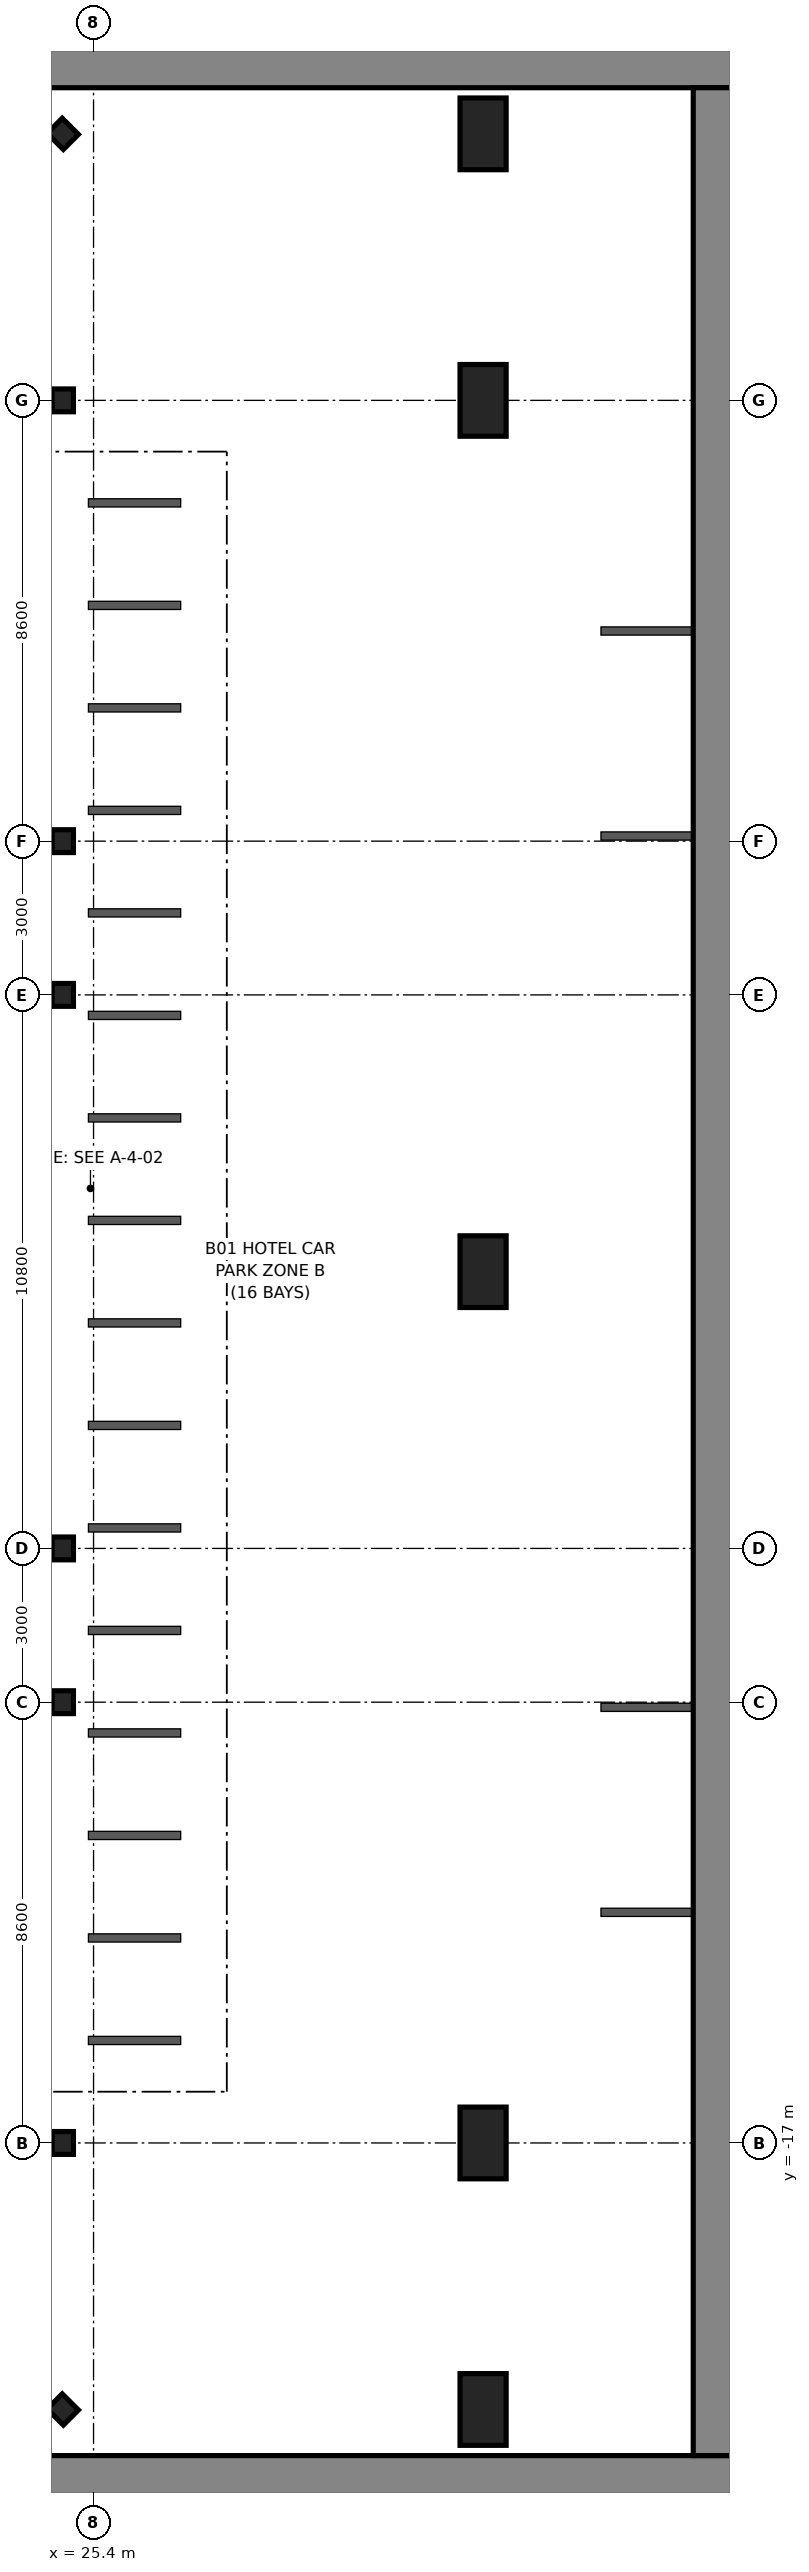
"""IFC4 building model, lengths in metres.
Left out: names, types, materials, properties, quantities, classifications, styles, units other than length and angle.
Written with IfcOpenShell. Run it as: python <this file> out.ifc"""

import sys

from ifc_helpers import new_model, si_unit, direction, frame, frame_2d, origin, origin_2d, place, context, subcontext, project, spatial, rectangle, i_section, extrude, source, transform, mapped, element, save


model = new_model("IFC4")
c1 = context("Model", 3, precision=1e-05, world=origin(), true_north=direction((0.0, 1.0)))
c2 = subcontext(c1, "Body", "Model", "MODEL_VIEW")
j1 = project(units=[si_unit("LENGTHUNIT", "METRE"), si_unit("PLANEANGLEUNIT", "RADIAN")], contexts=[c1])
p1 = place(None, origin())
s1 = spatial("IfcSite", under=j1, at=p1, CompositionType="ELEMENT")
p2 = place(p1, origin())
s2 = spatial("IfcBuilding", under=s1, at=p2, CompositionType="ELEMENT")
p3 = place(p2, frame((0.0, 0.0, -5.4)))
s3 = spatial("IfcBuildingStorey", under=s2, at=p3, CompositionType="ELEMENT", Elevation=-5.4)
m1 = source(origin(), c2, "Body", "SweptSolid", [
    extrude(rectangle(XDim=76.0, YDim=0.9, at=frame_2d((38.0, 0.0))), origin(), (0.0, 0.0, 1.0), 4.98),
])
for number, where, z_axis, x_axis in (
    (1, (-38.0, -23.55, 0.0), (0.0, 0.0, 1.0), (1.0, 0.0, 0.0)),
    (2, (-38.0, 23.55, 0.0), (0.0, 0.0, 1.0), (1.0, 0.0, 0.0)),
):
    element("IfcWall", number, at=place(p3, frame(where, z_axis=z_axis, x_axis=x_axis)), inside=s3, PredefinedType="SHEAR", context=c2, shape_type="MappedRepresentation", body=[
        mapped(m1, transform((0.0, 0.0, 0.0), scale=1.0)),
    ])
m2 = source(origin(), c2, "Body", "SweptSolid", [
    extrude(rectangle(XDim=46.2, YDim=0.9, at=frame_2d((23.1, 0.0))), origin(), (0.0, 0.0, 1.0), 4.98),
])
p4 = place(p3, frame((37.55, -23.1, 0.0), z_axis=(0.0, 0.0, 1.0), x_axis=(0.0, 1.0, 0.0)))
e3 = element("IfcWall", 3, at=p4, inside=s3, PredefinedType="SHEAR", context=c2, shape_type="MappedRepresentation", body=[
    mapped(m2, transform((0.0, 0.0, 0.0), scale=1.0)),
])
m3 = source(origin(), c2, "Body", "SweptSolid", [
    extrude(rectangle(XDim=0.9, YDim=1.4, at=origin_2d()), origin(), (0.0, 0.0, 1.0), 5.355),
])
for number, where, z_axis, x_axis in (
    (4, (33.0, -22.2, 0.0), (0.0, 0.0, 1.0), (1.0, 0.0, 0.0)),
    (5, (33.0, -17.0, 0.0), (0.0, 0.0, 1.0), (1.0, 0.0, 0.0)),
    (6, (33.0, 0.0, 0.0), (0.0, 0.0, 1.0), (1.0, 0.0, 0.0)),
    (7, (33.0, 17.0, 0.0), (0.0, 0.0, 1.0), (1.0, 0.0, 0.0)),
    (8, (33.0, 22.2, 0.0), (0.0, 0.0, 1.0), (1.0, 0.0, 0.0)),
):
    element("IfcColumn", number, at=place(p3, frame(where, z_axis=z_axis, x_axis=x_axis)), inside=s3, PredefinedType="PILASTER", context=c2, shape_type="MappedRepresentation", body=[
        mapped(m3, transform((0.0, 0.0, 0.0), scale=1.0)),
    ])
m4 = source(origin(), c2, "Body", "SweptSolid", [
    extrude(i_section(OverallWidth=0.416, OverallDepth=0.446, WebThickness=0.025, FlangeThickness=0.04, at=origin_2d()), origin(), (0.0, 0.0, 1.0), 5.355),
])
for number, where, z_axis, x_axis in (
    (9, (24.8, -17.0, 0.0), (0.0, 0.0, 1.0), (1.0, 0.0, 0.0)),
    (10, (24.8, -8.4, 0.0), (0.0, 0.0, 1.0), (1.0, 0.0, 0.0)),
    (11, (24.8, -5.4, 0.0), (0.0, 0.0, 1.0), (1.0, 0.0, 0.0)),
    (12, (24.8, 5.4, 0.0), (0.0, 0.0, 1.0), (1.0, 0.0, 0.0)),
    (13, (24.8, 8.4, 0.0), (0.0, 0.0, 1.0), (1.0, 0.0, 0.0)),
    (14, (24.8, 17.0, 0.0), (0.0, 0.0, 1.0), (1.0, 0.0, 0.0)),
    (15, (24.8, -22.2, 0.0), (0.0, 0.0, 1.0), (0.707, 0.707, 0.0)),
    (16, (24.8, 22.2, 0.0), (0.0, 0.0, 1.0), (0.707, 0.707, 0.0)),
):
    element("IfcColumn", number, at=place(p3, frame(where, z_axis=z_axis, x_axis=x_axis)), inside=s3, PredefinedType="COLUMN", context=c2, shape_type="MappedRepresentation", body=[
        mapped(m4, transform((0.0, 0.0, 0.0), scale=1.0)),
    ])
save(model, sys.argv[1])
